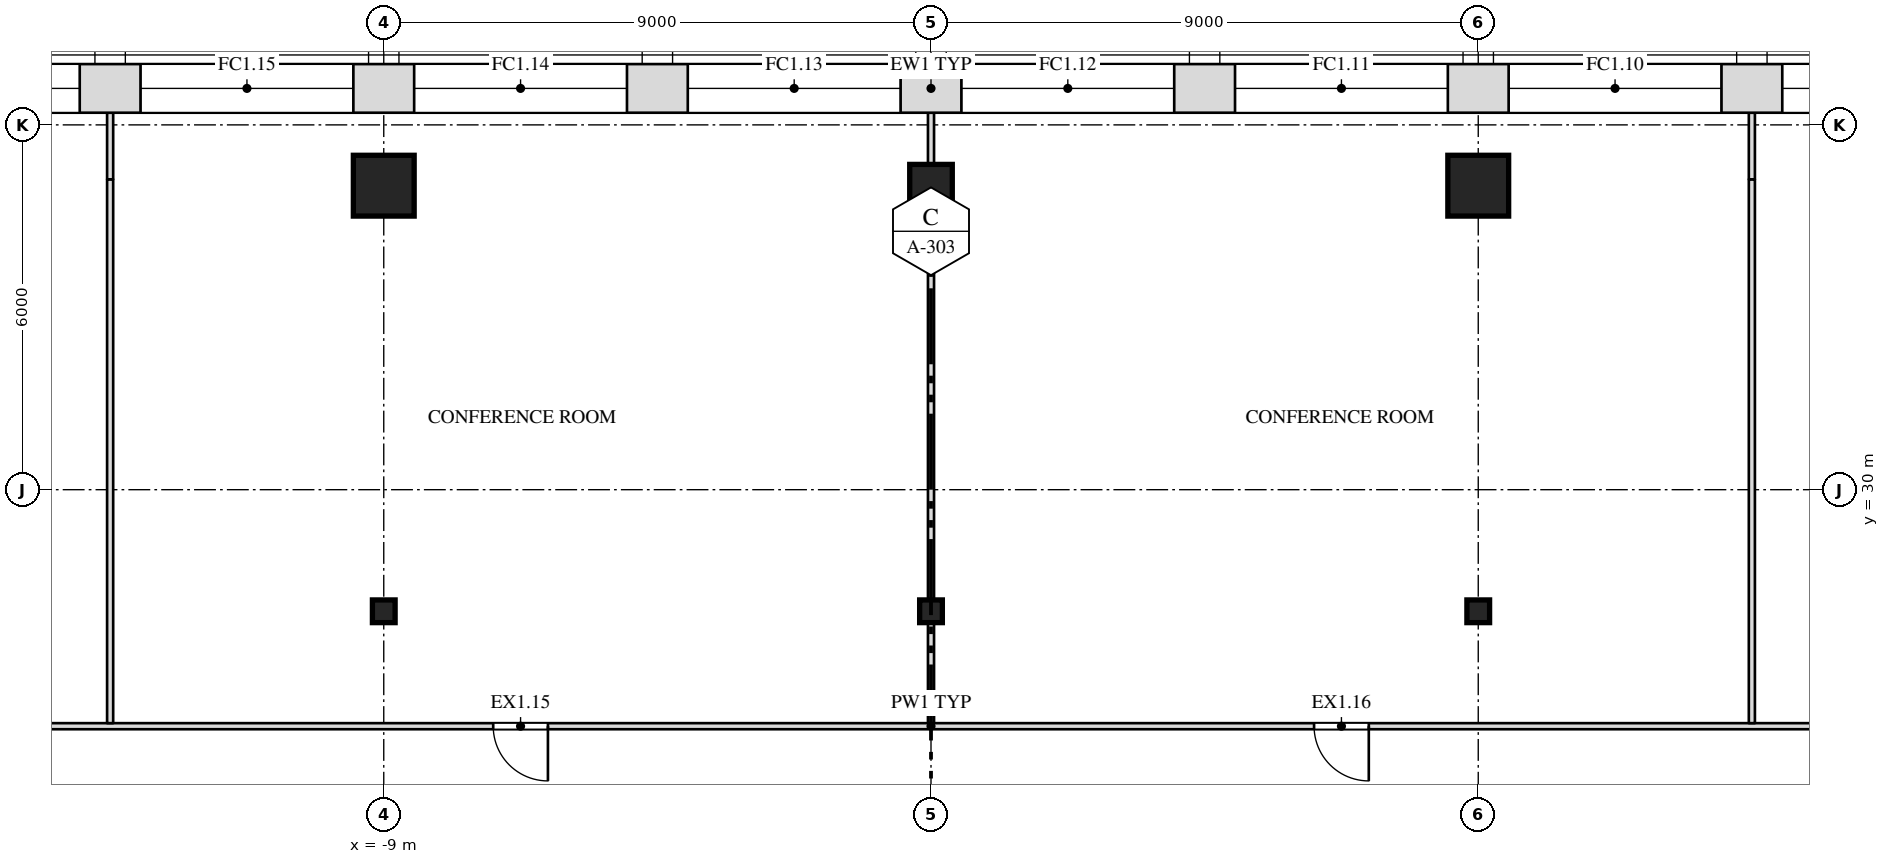
"""IFC4 building model, lengths in metres.
Left out: names, types, materials, properties, quantities, classifications, styles, units other than length and angle.
Written with IfcOpenShell. Run it as: python <this file> out.ifc"""

import sys

from ifc_helpers import new_model, si_unit, direction, frame, frame_2d, origin, origin_2d, place, context, subcontext, project, spatial, rectangle, i_section, extrude, element, fill, save


model = new_model("IFC4")
c1 = context("Model", 3, precision=1e-05, world=origin(), true_north=direction((0.0, 1.0)))
c2 = subcontext(c1, "Body", "Model", "MODEL_VIEW")
j1 = project(units=[si_unit("LENGTHUNIT", "METRE"), si_unit("PLANEANGLEUNIT", "RADIAN")], contexts=[c1])
p1 = place(None, origin())
s1 = spatial("IfcSite", under=j1, at=p1, CompositionType="ELEMENT")
p2 = place(p1, origin())
s2 = spatial("IfcBuilding", under=s1, at=p2, CompositionType="ELEMENT")
p3 = place(p2, frame((0.0, 0.0, 272.5)))
s3 = spatial("IfcBuildingStorey", under=s2, at=p3, CompositionType="ELEMENT", Elevation=272.5)
for number, where, z_axis, x_axis in (
    (1, (-9.0, 28.0, 0.0), (0.0, 0.0, 1.0), (1.0, 0.0, 0.0)),
    (2, (0.0, 28.0, 0.0), (0.0, 0.0, 1.0), (1.0, 0.0, 0.0)),
    (3, (9.0, 28.0, 0.0), (0.0, 0.0, 1.0), (1.0, 0.0, 0.0)),
):
    element("IfcColumn", number, at=place(p3, frame(where, z_axis=z_axis, x_axis=x_axis)), inside=s3, PredefinedType="COLUMN", context=c2, shape_type="SweptSolid", body=[
        extrude(i_section(OverallWidth=0.373, OverallDepth=0.373, WebThickness=0.016, FlangeThickness=0.026, at=origin_2d()), origin(), (0.0, 0.0, 1.0), 4.0),
    ])
p4 = place(p3, frame((-9.0, 35.0, 0.0), z_axis=(0.0, 0.0, 1.0), x_axis=(1.0, 0.0, 0.0)))
e4 = element("IfcColumn", 4, at=p4, inside=s3, PredefinedType="COLUMN", context=c2, shape_type="SweptSolid", body=[
    extrude(rectangle(XDim=1.0, YDim=1.0, at=origin_2d()), origin(), (0.0, 0.0, 1.0), 4.0),
])
p5 = place(p3, frame((0.0, 35.0, 0.0), z_axis=(0.0, 0.0, 1.0), x_axis=(1.0, 0.0, 0.0)))
e5 = element("IfcColumn", 5, at=p5, inside=s3, PredefinedType="COLUMN", context=c2, shape_type="SweptSolid", body=[
    extrude(rectangle(XDim=0.7, YDim=0.7, at=origin_2d()), origin(), (0.0, 0.0, 1.0), 4.0),
])
p6 = place(p3, frame((9.0, 35.0, 0.0), z_axis=(0.0, 0.0, 1.0), x_axis=(1.0, 0.0, 0.0)))
e6 = element("IfcColumn", 6, at=p6, inside=s3, PredefinedType="COLUMN", context=c2, shape_type="SweptSolid", body=[
    extrude(rectangle(XDim=1.0, YDim=1.0, at=origin_2d()), origin(), (0.0, 0.0, 1.0), 4.0),
])
p7 = place(p3, frame((-35.2, 26.11, 0.0), z_axis=(0.0, 0.0, 1.0), x_axis=(1.0, 0.0, 0.0)))
e7 = element("IfcWall", 7, at=p7, inside=s3, PredefinedType="PARTITIONING", context=c2, shape_type="SweptSolid", body=[
    extrude(rectangle(XDim=70.4, YDim=0.1, at=frame_2d((35.2, 0.0))), origin(), (0.0, 0.0, 1.0), 3.78),
])
p8 = place(p7, frame((3.65, 0.0, 0.0)))
e8 = element("IfcOpeningElement", 8, at=p8, cuts=e7, PredefinedType="OPENING", context=c2, shape_type="SweptSolid", body=[
    extrude(rectangle(XDim=0.9, YDim=2.1, at=frame_2d((0.45, 1.05))), frame((0.0, 0.062, 0.0), z_axis=(0.0, -1.0, 0.0), x_axis=(1.0, 0.0, 0.0)), (0.0, 0.0, 1.0), 0.124),
])
p9 = place(p7, frame((14.05, 0.0, 0.0)))
e9 = element("IfcOpeningElement", 9, at=p9, cuts=e7, PredefinedType="OPENING", context=c2, shape_type="SweptSolid", body=[
    extrude(rectangle(XDim=1.8, YDim=2.1, at=frame_2d((0.9, 1.05))), frame((0.0, 0.062, 0.0), z_axis=(0.0, -1.0, 0.0), x_axis=(1.0, 0.0, 0.0)), (0.0, 0.0, 1.0), 0.124),
])
p10 = place(p7, frame((28.0, 0.0, 0.0)))
e10 = element("IfcOpeningElement", 10, at=p10, cuts=e7, PredefinedType="OPENING", context=c2, shape_type="SweptSolid", body=[
    extrude(rectangle(XDim=0.9, YDim=2.1, at=frame_2d((0.45, 1.05))), frame((0.0, 0.062, 0.0), z_axis=(0.0, -1.0, 0.0), x_axis=(1.0, 0.0, 0.0)), (0.0, 0.0, 1.0), 0.124),
])
p11 = place(p7, frame((41.5, 0.0, 0.0)))
e11 = element("IfcOpeningElement", 11, at=p11, cuts=e7, PredefinedType="OPENING", context=c2, shape_type="SweptSolid", body=[
    extrude(rectangle(XDim=0.9, YDim=2.1, at=frame_2d((0.45, 1.05))), frame((0.0, 0.062, 0.0), z_axis=(0.0, -1.0, 0.0), x_axis=(1.0, 0.0, 0.0)), (0.0, 0.0, 1.0), 0.124),
])
p12 = place(p7, frame((54.55, 0.0, 0.0)))
e12 = element("IfcOpeningElement", 12, at=p12, cuts=e7, PredefinedType="OPENING", context=c2, shape_type="SweptSolid", body=[
    extrude(rectangle(XDim=1.8, YDim=2.1, at=frame_2d((0.9, 1.05))), frame((0.0, 0.062, 0.0), z_axis=(0.0, -1.0, 0.0), x_axis=(1.0, 0.0, 0.0)), (0.0, 0.0, 1.0), 0.124),
])
p13 = place(p7, frame((65.85, 0.0, 0.0)))
e13 = element("IfcOpeningElement", 13, at=p13, cuts=e7, PredefinedType="OPENING", context=c2, shape_type="SweptSolid", body=[
    extrude(rectangle(XDim=0.9, YDim=2.1, at=frame_2d((0.45, 1.05))), frame((0.0, 0.062, 0.0), z_axis=(0.0, -1.0, 0.0), x_axis=(1.0, 0.0, 0.0)), (0.0, 0.0, 1.0), 0.124),
])
p14 = place(p3, frame((-13.5, 26.16, 0.0), z_axis=(0.0, 0.0, 1.0), x_axis=(0.0, 1.0, 0.0)))
e14 = element("IfcWall", 14, at=p14, inside=s3, PredefinedType="PARTITIONING", context=c2, shape_type="SweptSolid", body=[
    extrude(rectangle(XDim=8.945, YDim=0.1, at=frame_2d((4.472, 0.0))), origin(), (0.0, 0.0, 1.0), 3.247),
])
p15 = place(p3, frame((-13.5, 35.104, 0.0), z_axis=(0.0, 0.0, 1.0), x_axis=(0.0, 1.0, 0.0)))
e15 = element("IfcWall", 15, at=p15, inside=s3, PredefinedType="PARTITIONING", context=c2, shape_type="SweptSolid", body=[
    extrude(rectangle(XDim=1.095, YDim=0.1, at=frame_2d((0.548, 0.0))), origin(), (0.0, 0.0, 1.0), 3.78),
])
p16 = place(p3, frame((0.0, 26.16, 0.0), z_axis=(0.0, 0.0, 1.0), x_axis=(0.0, 1.0, 0.0)))
e16 = element("IfcWall", 16, at=p16, inside=s3, PredefinedType="PARTITIONING", context=c2, shape_type="SweptSolid", body=[
    extrude(rectangle(XDim=1.653, YDim=0.1, at=frame_2d((0.827, 0.0))), origin(), (0.0, 0.0, 1.0), 3.247),
])
p17 = place(p3, frame((0.0, 28.187, 0.0), z_axis=(0.0, 0.0, 1.0), x_axis=(0.0, 1.0, 0.0)))
e17 = element("IfcWall", 17, at=p17, inside=s3, PredefinedType="PARTITIONING", context=c2, shape_type="SweptSolid", body=[
    extrude(rectangle(XDim=6.313, YDim=0.1, at=frame_2d((3.157, 0.0))), origin(), (0.0, 0.0, 1.0), 3.247),
])
p18 = place(p3, frame((13.5, 26.16, 0.0), z_axis=(0.0, 0.0, 1.0), x_axis=(0.0, 1.0, 0.0)))
e18 = element("IfcWall", 18, at=p18, inside=s3, PredefinedType="PARTITIONING", context=c2, shape_type="SweptSolid", body=[
    extrude(rectangle(XDim=8.945, YDim=0.1, at=frame_2d((4.472, 0.0))), origin(), (0.0, 0.0, 1.0), 3.247),
])
p19 = place(p3, frame((13.5, 35.104, 0.0), z_axis=(0.0, 0.0, 1.0), x_axis=(0.0, 1.0, 0.0)))
e19 = element("IfcWall", 19, at=p19, inside=s3, PredefinedType="PARTITIONING", context=c2, shape_type="SweptSolid", body=[
    extrude(rectangle(XDim=1.095, YDim=0.1, at=frame_2d((0.548, 0.0))), origin(), (0.0, 0.0, 1.0), 3.78),
])
p20 = place(p3, frame((0.0, 35.35, 0.0), z_axis=(0.0, 0.0, 1.0), x_axis=(0.0, 1.0, 0.0)))
e20 = element("IfcWall", 20, at=p20, inside=s3, PredefinedType="PARTITIONING", context=c2, shape_type="SweptSolid", body=[
    extrude(rectangle(XDim=0.85, YDim=0.1, at=frame_2d((0.425, 0.0))), origin(), (0.0, 0.0, 1.0), 3.78),
])
p21 = place(p3, frame((29.948, 36.6, 0.0), z_axis=(0.0, 0.0, 1.0), x_axis=(-1.0, 0.0, 0.0)))
e21 = element("IfcWall", 21, at=p21, inside=s3, PredefinedType="SOLIDWALL", context=c2, shape_type="SweptSolid", body=[
    extrude(rectangle(XDim=59.895, YDim=0.8, at=frame_2d((29.948, 0.0))), origin(), (0.0, 0.0, 1.0), 3.78),
])
p22 = place(p21, frame((3.448, 0.0, 1.0)))
e22 = element("IfcOpeningElement", 22, at=p22, cuts=e21, PredefinedType="OPENING", context=c2, shape_type="SweptSolid", body=[
    extrude(rectangle(XDim=3.5, YDim=2.5, at=frame_2d((1.75, 1.25))), frame((0.0, 0.412, 0.0), z_axis=(0.0, -1.0, 0.0), x_axis=(1.0, 0.0, 0.0)), (0.0, 0.0, 1.0), 0.824),
])
p23 = place(p21, frame((7.948, 0.0, 1.0)))
e23 = element("IfcOpeningElement", 23, at=p23, cuts=e21, PredefinedType="OPENING", context=c2, shape_type="SweptSolid", body=[
    extrude(rectangle(XDim=3.5, YDim=2.5, at=frame_2d((1.75, 1.25))), frame((0.0, 0.412, 0.0), z_axis=(0.0, -1.0, 0.0), x_axis=(1.0, 0.0, 0.0)), (0.0, 0.0, 1.0), 0.824),
])
p24 = place(p21, frame((12.448, 0.0, 1.0)))
e24 = element("IfcOpeningElement", 24, at=p24, cuts=e21, PredefinedType="OPENING", context=c2, shape_type="SweptSolid", body=[
    extrude(rectangle(XDim=3.5, YDim=2.5, at=frame_2d((1.75, 1.25))), frame((0.0, 0.412, 0.0), z_axis=(0.0, -1.0, 0.0), x_axis=(1.0, 0.0, 0.0)), (0.0, 0.0, 1.0), 0.824),
])
p25 = place(p21, frame((16.948, 0.0, 1.0)))
e25 = element("IfcOpeningElement", 25, at=p25, cuts=e21, PredefinedType="OPENING", context=c2, shape_type="SweptSolid", body=[
    extrude(rectangle(XDim=3.5, YDim=2.5, at=frame_2d((1.75, 1.25))), frame((0.0, 0.412, 0.0), z_axis=(0.0, -1.0, 0.0), x_axis=(1.0, 0.0, 0.0)), (0.0, 0.0, 1.0), 0.824),
])
p26 = place(p21, frame((21.448, 0.0, 1.0)))
e26 = element("IfcOpeningElement", 26, at=p26, cuts=e21, PredefinedType="OPENING", context=c2, shape_type="SweptSolid", body=[
    extrude(rectangle(XDim=3.5, YDim=2.5, at=frame_2d((1.75, 1.25))), frame((0.0, 0.412, 0.0), z_axis=(0.0, -1.0, 0.0), x_axis=(1.0, 0.0, 0.0)), (0.0, 0.0, 1.0), 0.824),
])
p27 = place(p21, frame((25.948, 0.0, 1.0)))
e27 = element("IfcOpeningElement", 27, at=p27, cuts=e21, PredefinedType="OPENING", context=c2, shape_type="SweptSolid", body=[
    extrude(rectangle(XDim=3.5, YDim=2.5, at=frame_2d((1.75, 1.25))), frame((0.0, 0.412, 0.0), z_axis=(0.0, -1.0, 0.0), x_axis=(1.0, 0.0, 0.0)), (0.0, 0.0, 1.0), 0.824),
])
p28 = place(p21, frame((30.448, 0.0, 1.0)))
e28 = element("IfcOpeningElement", 28, at=p28, cuts=e21, PredefinedType="OPENING", context=c2, shape_type="SweptSolid", body=[
    extrude(rectangle(XDim=3.5, YDim=2.5, at=frame_2d((1.75, 1.25))), frame((0.0, 0.412, 0.0), z_axis=(0.0, -1.0, 0.0), x_axis=(1.0, 0.0, 0.0)), (0.0, 0.0, 1.0), 0.824),
])
p29 = place(p21, frame((34.948, 0.0, 1.0)))
e29 = element("IfcOpeningElement", 29, at=p29, cuts=e21, PredefinedType="OPENING", context=c2, shape_type="SweptSolid", body=[
    extrude(rectangle(XDim=3.5, YDim=2.5, at=frame_2d((1.75, 1.25))), frame((0.0, 0.412, 0.0), z_axis=(0.0, -1.0, 0.0), x_axis=(1.0, 0.0, 0.0)), (0.0, 0.0, 1.0), 0.824),
])
p30 = place(p21, frame((39.448, 0.0, 1.0)))
e30 = element("IfcOpeningElement", 30, at=p30, cuts=e21, PredefinedType="OPENING", context=c2, shape_type="SweptSolid", body=[
    extrude(rectangle(XDim=3.5, YDim=2.5, at=frame_2d((1.75, 1.25))), frame((0.0, 0.412, 0.0), z_axis=(0.0, -1.0, 0.0), x_axis=(1.0, 0.0, 0.0)), (0.0, 0.0, 1.0), 0.824),
])
p31 = place(p21, frame((43.948, 0.0, 1.0)))
e31 = element("IfcOpeningElement", 31, at=p31, cuts=e21, PredefinedType="OPENING", context=c2, shape_type="SweptSolid", body=[
    extrude(rectangle(XDim=3.5, YDim=2.5, at=frame_2d((1.75, 1.25))), frame((0.0, 0.412, 0.0), z_axis=(0.0, -1.0, 0.0), x_axis=(1.0, 0.0, 0.0)), (0.0, 0.0, 1.0), 0.824),
])
p32 = place(p21, frame((48.448, 0.0, 1.0)))
e32 = element("IfcOpeningElement", 32, at=p32, cuts=e21, PredefinedType="OPENING", context=c2, shape_type="SweptSolid", body=[
    extrude(rectangle(XDim=3.5, YDim=2.5, at=frame_2d((1.75, 1.25))), frame((0.0, 0.412, 0.0), z_axis=(0.0, -1.0, 0.0), x_axis=(1.0, 0.0, 0.0)), (0.0, 0.0, 1.0), 0.824),
])
p33 = place(p21, frame((52.948, 0.0, 1.0)))
e33 = element("IfcOpeningElement", 33, at=p33, cuts=e21, PredefinedType="OPENING", context=c2, shape_type="SweptSolid", body=[
    extrude(rectangle(XDim=3.5, YDim=2.5, at=frame_2d((1.75, 1.25))), frame((0.0, 0.412, 0.0), z_axis=(0.0, -1.0, 0.0), x_axis=(1.0, 0.0, 0.0)), (0.0, 0.0, 1.0), 0.824),
])
p34 = place(p10, origin())
e34 = element("IfcDoor", 34, at=p34, inside=s3, OperationType="SINGLE_SWING_LEFT", PredefinedType="DOOR", context=c2, shape_type="SweptSolid", body=[
    extrude(rectangle(XDim=0.9, YDim=2.1, at=frame_2d((0.45, 1.05))), frame((0.0, 0.025, 0.0), z_axis=(0.0, -1.0, 0.0), x_axis=(1.0, 0.0, 0.0)), (0.0, 0.0, 1.0), 0.05),
])
fill(e10, e34)
p35 = place(p11, origin())
e35 = element("IfcDoor", 35, at=p35, inside=s3, OperationType="SINGLE_SWING_LEFT", PredefinedType="DOOR", context=c2, shape_type="SweptSolid", body=[
    extrude(rectangle(XDim=0.9, YDim=2.1, at=frame_2d((0.45, 1.05))), frame((0.0, 0.025, 0.0), z_axis=(0.0, -1.0, 0.0), x_axis=(1.0, 0.0, 0.0)), (0.0, 0.0, 1.0), 0.05),
])
fill(e11, e35)
p36 = place(p24, origin())
e36 = element("IfcWindow", 36, at=p36, inside=s3, PartitioningType="SINGLE_PANEL", PredefinedType="WINDOW", context=c2, shape_type="SweptSolid", body=[
    extrude(rectangle(XDim=3.5, YDim=2.5, at=frame_2d((1.75, 1.25))), frame((0.0, 0.03, 0.0), z_axis=(0.0, -1.0, 0.0), x_axis=(1.0, 0.0, 0.0)), (0.0, 0.0, 1.0), 0.06),
])
fill(e24, e36)
p37 = place(p25, origin())
e37 = element("IfcWindow", 37, at=p37, inside=s3, PartitioningType="SINGLE_PANEL", PredefinedType="WINDOW", context=c2, shape_type="SweptSolid", body=[
    extrude(rectangle(XDim=3.5, YDim=2.5, at=frame_2d((1.75, 1.25))), frame((0.0, 0.03, 0.0), z_axis=(0.0, -1.0, 0.0), x_axis=(1.0, 0.0, 0.0)), (0.0, 0.0, 1.0), 0.06),
])
fill(e25, e37)
p38 = place(p26, origin())
e38 = element("IfcWindow", 38, at=p38, inside=s3, PartitioningType="SINGLE_PANEL", PredefinedType="WINDOW", context=c2, shape_type="SweptSolid", body=[
    extrude(rectangle(XDim=3.5, YDim=2.5, at=frame_2d((1.75, 1.25))), frame((0.0, 0.03, 0.0), z_axis=(0.0, -1.0, 0.0), x_axis=(1.0, 0.0, 0.0)), (0.0, 0.0, 1.0), 0.06),
])
fill(e26, e38)
p39 = place(p27, origin())
e39 = element("IfcWindow", 39, at=p39, inside=s3, PartitioningType="SINGLE_PANEL", PredefinedType="WINDOW", context=c2, shape_type="SweptSolid", body=[
    extrude(rectangle(XDim=3.5, YDim=2.5, at=frame_2d((1.75, 1.25))), frame((0.0, 0.03, 0.0), z_axis=(0.0, -1.0, 0.0), x_axis=(1.0, 0.0, 0.0)), (0.0, 0.0, 1.0), 0.06),
])
fill(e27, e39)
p40 = place(p28, origin())
e40 = element("IfcWindow", 40, at=p40, inside=s3, PartitioningType="SINGLE_PANEL", PredefinedType="WINDOW", context=c2, shape_type="SweptSolid", body=[
    extrude(rectangle(XDim=3.5, YDim=2.5, at=frame_2d((1.75, 1.25))), frame((0.0, 0.03, 0.0), z_axis=(0.0, -1.0, 0.0), x_axis=(1.0, 0.0, 0.0)), (0.0, 0.0, 1.0), 0.06),
])
fill(e28, e40)
p41 = place(p29, origin())
e41 = element("IfcWindow", 41, at=p41, inside=s3, PartitioningType="SINGLE_PANEL", PredefinedType="WINDOW", context=c2, shape_type="SweptSolid", body=[
    extrude(rectangle(XDim=3.5, YDim=2.5, at=frame_2d((1.75, 1.25))), frame((0.0, 0.03, 0.0), z_axis=(0.0, -1.0, 0.0), x_axis=(1.0, 0.0, 0.0)), (0.0, 0.0, 1.0), 0.06),
])
fill(e29, e41)
p42 = place(p30, origin())
e42 = element("IfcWindow", 42, at=p42, inside=s3, PartitioningType="SINGLE_PANEL", PredefinedType="WINDOW", context=c2, shape_type="SweptSolid", body=[
    extrude(rectangle(XDim=3.5, YDim=2.5, at=frame_2d((1.75, 1.25))), frame((0.0, 0.03, 0.0), z_axis=(0.0, -1.0, 0.0), x_axis=(1.0, 0.0, 0.0)), (0.0, 0.0, 1.0), 0.06),
])
fill(e30, e42)
p43 = place(p31, origin())
e43 = element("IfcWindow", 43, at=p43, inside=s3, PartitioningType="SINGLE_PANEL", PredefinedType="WINDOW", context=c2, shape_type="SweptSolid", body=[
    extrude(rectangle(XDim=3.5, YDim=2.5, at=frame_2d((1.75, 1.25))), frame((0.0, 0.03, 0.0), z_axis=(0.0, -1.0, 0.0), x_axis=(1.0, 0.0, 0.0)), (0.0, 0.0, 1.0), 0.06),
])
fill(e31, e43)
save(model, sys.argv[1])
